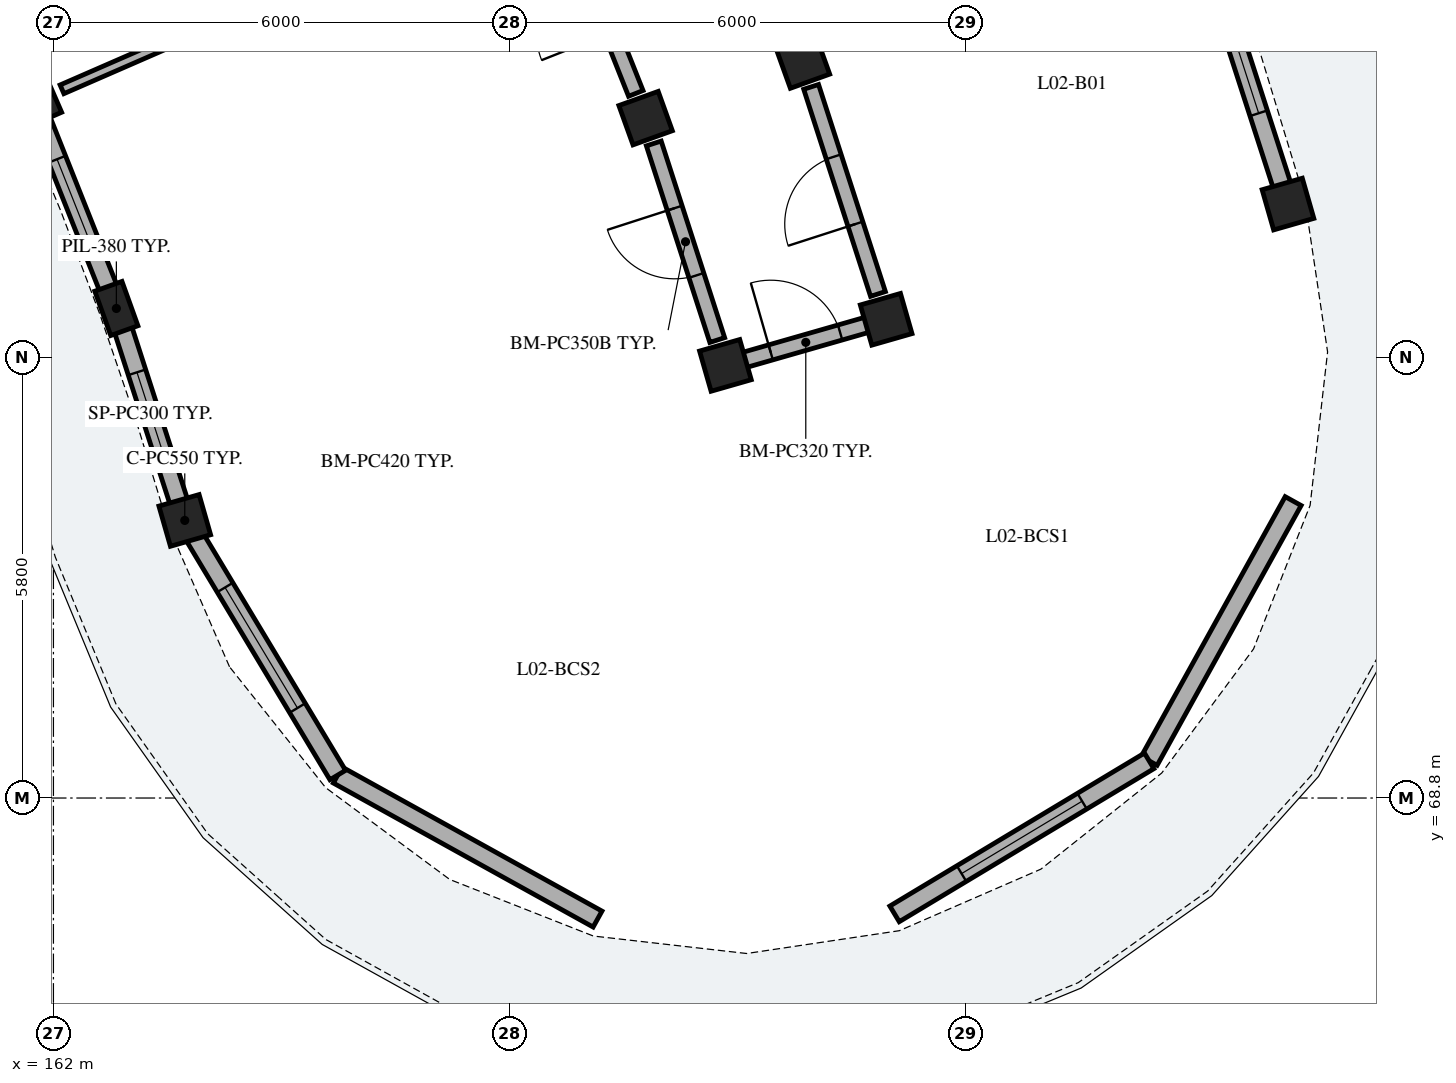
"""IFC4 building model, lengths in metres.
Left out: names, types, materials, properties, quantities, classifications, styles, units other than length and angle.
Written with IfcOpenShell. Run it as: python <this file> out.ifc"""

import sys

from ifc_helpers import new_model, si_unit, direction, frame, frame_2d, origin, origin_2d, place, context, subcontext, project, spatial, rectangle, extrude, element, fill, save


model = new_model("IFC4")
c1 = context("Model", 3, precision=1e-05, world=origin(), true_north=direction((0.0, 1.0)))
c2 = subcontext(c1, "Body", "Model", "MODEL_VIEW")
j1 = project(units=[si_unit("LENGTHUNIT", "METRE"), si_unit("PLANEANGLEUNIT", "RADIAN")], contexts=[c1])
p1 = place(None, origin())
s1 = spatial("IfcSite", under=j1, at=p1, CompositionType="ELEMENT")
p2 = place(p1, origin())
s2 = spatial("IfcBuilding", under=s1, at=p2, CompositionType="ELEMENT")
p3 = place(p2, frame((0.0, 0.0, 8.84)))
s3 = spatial("IfcBuildingStorey", under=s2, at=p3, CompositionType="ELEMENT", Elevation=8.84)
for number, where, z_axis, x_axis in (
    (1, (163.728, 72.452, 0.0), (0.0, 0.0, 1.0), (0.961, 0.276, 0.0)),
    (2, (170.841, 74.492, 0.0), (0.0, 0.0, 1.0), (0.961, 0.276, 0.0)),
    (3, (172.956, 75.098, 0.0), (0.0, 0.0, 1.0), (0.961, 0.276, 0.0)),
    (4, (178.243, 76.614, 0.0), (0.0, 0.0, 1.0), (0.961, 0.276, 0.0)),
):
    element("IfcColumn", number, at=place(p3, frame(where, z_axis=z_axis, x_axis=x_axis)), inside=s3, PredefinedType="COLUMN", context=c2, shape_type="SweptSolid", body=[
        extrude(rectangle(XDim=0.55, YDim=0.55, at=origin_2d()), origin(), (0.0, 0.0, 1.0), 3.105),
    ])
p4 = place(p3, frame((162.828, 75.241, 0.0), z_axis=(0.0, 0.0, 1.0), x_axis=(0.941012076693, 0.338372976931, 0.0)))
e5 = element("IfcColumn", 5, at=p4, inside=s3, PredefinedType="PILASTER", context=c2, shape_type="SweptSolid", body=[
    extrude(rectangle(XDim=0.38, YDim=0.62, at=origin_2d()), origin(), (0.0, 0.0, 1.0), 3.105),
])
for number, where, z_axis, x_axis in (
    (6, (169.792, 77.745, 0.0), (0.0, 0.0, 1.0), (0.941, 0.338, 0.0)),
    (7, (171.862, 78.489, 0.0), (0.0, 0.0, 1.0), (0.941, 0.338, 0.0)),
    (8, (161.746, 77.964, 0.0), (0.0, 0.0, 1.0), (0.917, 0.4, 0.0)),
):
    element("IfcColumn", number, at=place(p3, frame(where, z_axis=z_axis, x_axis=x_axis)), inside=s3, PredefinedType="COLUMN", context=c2, shape_type="SweptSolid", body=[
        extrude(rectangle(XDim=0.55, YDim=0.55, at=origin_2d()), origin(), (0.0, 0.0, 1.0), 3.105),
    ])
p5 = place(p3, frame((178.168, 76.847, 0.0), z_axis=(0.0, 0.0, 1.0), x_axis=(-0.30720538788, 0.951643236543, 0.0)))
e9 = element("IfcWall", 9, at=p5, inside=s3, PredefinedType="SOLIDWALL", context=c2, shape_type="SweptSolid", body=[
    extrude(rectangle(XDim=3.521, YDim=0.24, at=frame_2d((1.76, 0.0))), origin(), (0.0, 0.0, 1.0), 2.355),
])
p6 = place(p5, frame((1.01, 0.0, 0.35)))
e10 = element("IfcOpeningElement", 10, at=p6, cuts=e9, PredefinedType="OPENING", context=c2, shape_type="SweptSolid", body=[
    extrude(rectangle(XDim=1.5, YDim=1.7, at=frame_2d((0.75, 0.85))), frame((0.0, 0.13, 0.0), z_axis=(0.0, -1.0, 0.0), x_axis=(1.0, 0.0, 0.0)), (0.0, 0.0, 1.0), 0.26),
])
p7 = place(p3, frame((163.653, 72.685, 0.0), z_axis=(0.0, 0.0, 1.0), x_axis=(-0.30716379336, 0.951656662903, 0.0)))
e11 = element("IfcWall", 11, at=p7, inside=s3, PredefinedType="SOLIDWALL", context=c2, shape_type="SweptSolid", body=[
    extrude(rectangle(XDim=2.525, YDim=0.24, at=frame_2d((1.263, 0.0))), origin(), (0.0, 0.0, 1.0), 2.355),
])
p8 = place(p7, frame((0.723, 0.0, 0.55)))
e12 = element("IfcOpeningElement", 12, at=p8, cuts=e11, PredefinedType="OPENING", context=c2, shape_type="SweptSolid", body=[
    extrude(rectangle(XDim=1.08, YDim=1.45, at=frame_2d((0.54, 0.725))), frame((0.0, 0.13, 0.0), z_axis=(0.0, -1.0, 0.0), x_axis=(1.0, 0.0, 0.0)), (0.0, 0.0, 1.0), 0.26),
])
p9 = place(p3, frame((162.769, 75.389, 0.0), z_axis=(0.0, 0.0, 1.0), x_axis=(-0.369122600107, 0.92938071106, 0.0)))
e13 = element("IfcWall", 13, at=p9, inside=s3, PredefinedType="SOLIDWALL", context=c2, shape_type="SweptSolid", body=[
    extrude(rectangle(XDim=2.525, YDim=0.24, at=frame_2d((1.263, 0.0))), origin(), (0.0, 0.0, 1.0), 2.355),
])
p10 = place(p9, frame((0.573, 0.0, 0.55)))
e14 = element("IfcOpeningElement", 14, at=p10, cuts=e13, PredefinedType="OPENING", context=c2, shape_type="SweptSolid", body=[
    extrude(rectangle(XDim=1.38, YDim=1.56, at=frame_2d((0.69, 0.78))), frame((0.0, 0.13, 0.0), z_axis=(0.0, -1.0, 0.0), x_axis=(1.0, 0.0, 0.0)), (0.0, 0.0, 1.0), 0.26),
])
p11 = place(p3, frame((178.311, 72.707, 0.0), z_axis=(0.0, 0.0, 1.0), x_axis=(-0.484841794757, -0.874601871743, 0.0)))
e15 = element("IfcWall", 15, at=p11, inside=s3, PredefinedType="SOLIDWALL", context=c2, shape_type="SweptSolid", body=[
    extrude(rectangle(XDim=3.908, YDim=0.24, at=frame_2d((1.954, 0.0))), origin(), (0.0, 0.0, 1.0), 2.355),
])
p12 = place(p3, frame((176.417, 69.289, 0.0), z_axis=(0.0, 0.0, 1.0), x_axis=(-0.85715098885, -0.515065221417, 0.0)))
e16 = element("IfcWall", 16, at=p12, inside=s3, PredefinedType="SOLIDWALL", context=c2, shape_type="SweptSolid", body=[
    extrude(rectangle(XDim=3.908, YDim=0.24, at=frame_2d((1.954, 0.0))), origin(), (0.0, 0.0, 1.0), 2.355),
])
p13 = place(p12, frame((1.029, 0.0, 0.4)))
e17 = element("IfcOpeningElement", 17, at=p13, cuts=e16, PredefinedType="OPENING", context=c2, shape_type="SweptSolid", body=[
    extrude(rectangle(XDim=1.85, YDim=1.72, at=frame_2d((0.925, 0.86))), frame((0.0, 0.13, 0.0), z_axis=(0.0, -1.0, 0.0), x_axis=(1.0, 0.0, 0.0)), (0.0, 0.0, 1.0), 0.26),
])
p14 = place(p3, frame((169.159, 67.208, 0.0), z_axis=(0.0, 0.0, 1.0), x_axis=(-0.874643043537, 0.484767517881, 0.0)))
e18 = element("IfcWall", 18, at=p14, inside=s3, PredefinedType="SOLIDWALL", context=c2, shape_type="SweptSolid", body=[
    extrude(rectangle(XDim=3.908, YDim=0.24, at=frame_2d((1.954, 0.0))), origin(), (0.0, 0.0, 1.0), 2.355),
])
p15 = place(p3, frame((165.741, 69.102, 0.0), z_axis=(0.0, 0.0, 1.0), x_axis=(-0.515037642827, 0.857167560324, 0.0)))
e19 = element("IfcWall", 19, at=p15, inside=s3, PredefinedType="SOLIDWALL", context=c2, shape_type="SweptSolid", body=[
    extrude(rectangle(XDim=3.908, YDim=0.24, at=frame_2d((1.954, 0.0))), origin(), (0.0, 0.0, 1.0), 2.355),
])
p16 = place(p15, frame((1.029, 0.0, 0.4)))
e20 = element("IfcOpeningElement", 20, at=p16, cuts=e19, PredefinedType="OPENING", context=c2, shape_type="SweptSolid", body=[
    extrude(rectangle(XDim=1.85, YDim=1.72, at=frame_2d((0.925, 0.86))), frame((0.0, 0.13, 0.0), z_axis=(0.0, -1.0, 0.0), x_axis=(1.0, 0.0, 0.0)), (0.0, 0.0, 1.0), 0.26),
])
p17 = place(p3, frame((172.849, 75.431, 0.0), z_axis=(0.0, 0.0, 1.0), x_axis=(-0.307157249761, 0.951658774939, 0.0)))
e21 = element("IfcWall", 21, at=p17, inside=s3, PredefinedType="PARTITIONING", context=c2, shape_type="SweptSolid", body=[
    extrude(rectangle(XDim=2.863, YDim=0.205, at=frame_2d((1.432, 0.0))), origin(), (0.0, 0.0, 1.0), 2.37),
])
p18 = place(p17, frame((0.967, 0.0, 0.0)))
e22 = element("IfcOpeningElement", 22, at=p18, cuts=e21, PredefinedType="OPENING", context=c2, shape_type="SweptSolid", body=[
    extrude(rectangle(XDim=0.93, YDim=2.12, at=frame_2d((0.465, 1.06))), frame((0.0, 0.113, 0.0), z_axis=(0.0, -1.0, 0.0), x_axis=(1.0, 0.0, 0.0)), (0.0, 0.0, 1.0), 0.225),
])
p19 = place(p3, frame((170.734, 74.825, 0.0), z_axis=(0.0, 0.0, 1.0), x_axis=(-0.307186478934, 0.95164934044, 0.0)))
e23 = element("IfcWall", 23, at=p19, inside=s3, PredefinedType="PARTITIONING", context=c2, shape_type="SweptSolid", body=[
    extrude(rectangle(XDim=2.718, YDim=0.205, at=frame_2d((1.359, 0.0))), origin(), (0.0, 0.0, 1.0), 2.37),
])
p20 = place(p19, frame((0.894, 0.0, 0.0)))
e24 = element("IfcOpeningElement", 24, at=p20, cuts=e23, PredefinedType="OPENING", context=c2, shape_type="SweptSolid", body=[
    extrude(rectangle(XDim=0.93, YDim=2.12, at=frame_2d((0.465, 1.06))), frame((0.0, 0.113, 0.0), z_axis=(0.0, -1.0, 0.0), x_axis=(1.0, 0.0, 0.0)), (0.0, 0.0, 1.0), 0.225),
])
p21 = place(p3, frame((169.662, 78.07, 0.0), z_axis=(0.0, 0.0, 1.0), x_axis=(-0.369237170461, 0.929335198919, 0.0)))
e25 = element("IfcWall", 25, at=p21, inside=s3, PredefinedType="PARTITIONING", context=c2, shape_type="SweptSolid", body=[
    extrude(rectangle(XDim=2.718, YDim=0.205, at=frame_2d((1.359, 0.0))), origin(), (0.0, 0.0, 1.0), 2.37),
])
p22 = place(p21, frame((0.864, 0.0, 0.0)))
e26 = element("IfcOpeningElement", 26, at=p22, cuts=e25, PredefinedType="OPENING", context=c2, shape_type="SweptSolid", body=[
    extrude(rectangle(XDim=0.99, YDim=2.16, at=frame_2d((0.495, 1.08))), frame((0.0, 0.113, 0.0), z_axis=(0.0, -1.0, 0.0), x_axis=(1.0, 0.0, 0.0)), (0.0, 0.0, 1.0), 0.225),
])
p23 = place(p3, frame((162.113, 78.124, 0.0), z_axis=(0.0, 0.0, 1.0), x_axis=(0.916668515796, 0.399648385645, 0.0)))
e27 = element("IfcWall", 27, at=p23, inside=s3, PredefinedType="PARTITIONING", context=c2, shape_type="SweptSolid", body=[
    extrude(rectangle(XDim=6.6, YDim=0.125, at=frame_2d((3.3, 0.0))), origin(), (0.0, 0.0, 1.0), 2.37),
])
p24 = place(p23, frame((2.855, 0.0, 0.0)))
e28 = element("IfcOpeningElement", 28, at=p24, cuts=e27, PredefinedType="OPENING", context=c2, shape_type="SweptSolid", body=[
    extrude(rectangle(XDim=0.89, YDim=2.1, at=frame_2d((0.445, 1.05))), frame((0.0, 0.073, 0.0), z_axis=(0.0, -1.0, 0.0), x_axis=(1.0, 0.0, 0.0)), (0.0, 0.0, 1.0), 0.145),
])
p25 = place(p3, frame((170.889, 74.506, 0.0), z_axis=(0.0, 0.0, 1.0), x_axis=(0.961264701934, 0.275626872449, 0.0)))
e29 = element("IfcWall", 29, at=p25, inside=s3, PredefinedType="PARTITIONING", context=c2, shape_type="SweptSolid", body=[
    extrude(rectangle(XDim=2.1, YDim=0.205, at=frame_2d((1.05, 0.0))), origin(), (0.0, 0.0, 1.0), 2.37),
])
p26 = place(p25, frame((0.57, 0.0, 0.0)))
e30 = element("IfcOpeningElement", 30, at=p26, cuts=e29, PredefinedType="OPENING", context=c2, shape_type="SweptSolid", body=[
    extrude(rectangle(XDim=0.95, YDim=2.13, at=frame_2d((0.475, 1.065))), frame((0.0, 0.113, 0.0), z_axis=(0.0, -1.0, 0.0), x_axis=(1.0, 0.0, 0.0)), (0.0, 0.0, 1.0), 0.225),
])
p27 = place(p6, origin())
e31 = element("IfcWindow", 31, at=p27, inside=s3, PartitioningType="SINGLE_PANEL", PredefinedType="WINDOW", context=c2, shape_type="SweptSolid", body=[
    extrude(rectangle(XDim=1.5, YDim=1.7, at=frame_2d((0.75, 0.85))), frame((0.0, 0.03, 0.0), z_axis=(0.0, -1.0, 0.0), x_axis=(1.0, 0.0, 0.0)), (0.0, 0.0, 1.0), 0.06),
])
fill(e10, e31)
p28 = place(p8, origin())
e32 = element("IfcWindow", 32, at=p28, inside=s3, PartitioningType="SINGLE_PANEL", PredefinedType="WINDOW", context=c2, shape_type="SweptSolid", body=[
    extrude(rectangle(XDim=1.08, YDim=1.45, at=frame_2d((0.54, 0.725))), frame((0.0, 0.03, 0.0), z_axis=(0.0, -1.0, 0.0), x_axis=(1.0, 0.0, 0.0)), (0.0, 0.0, 1.0), 0.06),
])
fill(e12, e32)
p29 = place(p10, origin())
e33 = element("IfcWindow", 33, at=p29, inside=s3, PartitioningType="SINGLE_PANEL", PredefinedType="WINDOW", context=c2, shape_type="SweptSolid", body=[
    extrude(rectangle(XDim=1.38, YDim=1.56, at=frame_2d((0.69, 0.78))), frame((0.0, 0.03, 0.0), z_axis=(0.0, -1.0, 0.0), x_axis=(1.0, 0.0, 0.0)), (0.0, 0.0, 1.0), 0.06),
])
fill(e14, e33)
p30 = place(p13, origin())
e34 = element("IfcWindow", 34, at=p30, inside=s3, PartitioningType="SINGLE_PANEL", PredefinedType="WINDOW", context=c2, shape_type="SweptSolid", body=[
    extrude(rectangle(XDim=1.85, YDim=1.72, at=frame_2d((0.925, 0.86))), frame((0.0, 0.03, 0.0), z_axis=(0.0, -1.0, 0.0), x_axis=(1.0, 0.0, 0.0)), (0.0, 0.0, 1.0), 0.06),
])
fill(e17, e34)
p31 = place(p16, origin())
e35 = element("IfcWindow", 35, at=p31, inside=s3, PartitioningType="SINGLE_PANEL", PredefinedType="WINDOW", context=c2, shape_type="SweptSolid", body=[
    extrude(rectangle(XDim=1.85, YDim=1.72, at=frame_2d((0.925, 0.86))), frame((0.0, 0.03, 0.0), z_axis=(0.0, -1.0, 0.0), x_axis=(1.0, 0.0, 0.0)), (0.0, 0.0, 1.0), 0.06),
])
fill(e20, e35)
p32 = place(p18, origin())
e36 = element("IfcDoor", 36, at=p32, inside=s3, OperationType="SINGLE_SWING_LEFT", PredefinedType="DOOR", context=c2, shape_type="SweptSolid", body=[
    extrude(rectangle(XDim=0.93, YDim=2.12, at=frame_2d((0.465, 1.06))), frame((0.0, 0.025, 0.0), z_axis=(0.0, -1.0, 0.0), x_axis=(1.0, 0.0, 0.0)), (0.0, 0.0, 1.0), 0.05),
])
fill(e22, e36)
p33 = place(p20, origin())
e37 = element("IfcDoor", 37, at=p33, inside=s3, OperationType="SINGLE_SWING_RIGHT", PredefinedType="DOOR", context=c2, shape_type="SweptSolid", body=[
    extrude(rectangle(XDim=0.93, YDim=2.12, at=frame_2d((0.465, 1.06))), frame((0.0, 0.025, 0.0), z_axis=(0.0, -1.0, 0.0), x_axis=(1.0, 0.0, 0.0)), (0.0, 0.0, 1.0), 0.05),
])
fill(e24, e37)
p34 = place(p26, origin())
e38 = element("IfcDoor", 38, at=p34, inside=s3, OperationType="SINGLE_SWING_LEFT", PredefinedType="DOOR", context=c2, shape_type="SweptSolid", body=[
    extrude(rectangle(XDim=0.95, YDim=2.13, at=frame_2d((0.475, 1.065))), frame((0.0, 0.025, 0.0), z_axis=(0.0, -1.0, 0.0), x_axis=(1.0, 0.0, 0.0)), (0.0, 0.0, 1.0), 0.05),
])
fill(e30, e38)
save(model, sys.argv[1])
